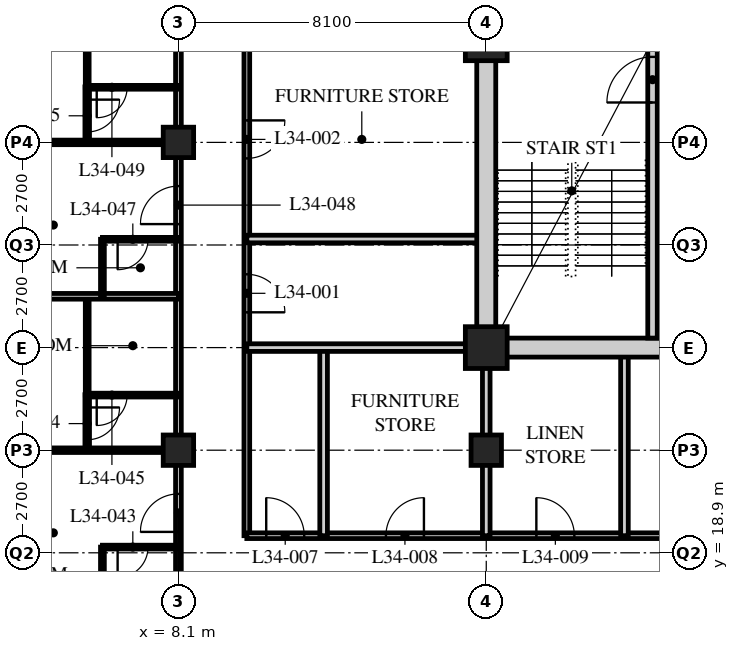
"""IFC4 building model, lengths in metres.
Left out: names, types, materials, properties, quantities, classifications, styles, units other than length and angle.
Written with IfcOpenShell. Run it as: python <this file> out.ifc"""

import sys

from ifc_helpers import new_model, si_unit, direction, frame, frame_2d, origin, origin_2d, place, context, subcontext, project, spatial, rectangle, hollow_rectangle, extrude, element, fill, save


model = new_model("IFC4")
c1 = context("Model", 3, precision=1e-05, world=origin(), true_north=direction((0.0, 1.0)))
c2 = subcontext(c1, "Body", "Model", "MODEL_VIEW")
j1 = project(units=[si_unit("LENGTHUNIT", "METRE"), si_unit("PLANEANGLEUNIT", "RADIAN")], contexts=[c1])
p1 = place(None, origin())
s1 = spatial("IfcSite", under=j1, at=p1, CompositionType="ELEMENT")
p2 = place(p1, origin())
s2 = spatial("IfcBuilding", under=s1, at=p2, CompositionType="ELEMENT")
p3 = place(p2, frame((0.0, 0.0, 134.0)))
s3 = spatial("IfcBuildingStorey", under=s2, at=p3, CompositionType="ELEMENT", Elevation=134.0)
for number, where, z_axis, x_axis in (
    (1, (8.1, 21.6, 0.0), (0.0, 0.0, 1.0), (1.0, 0.0, 0.0)),
    (2, (8.1, 29.7, 0.0), (0.0, 0.0, 1.0), (1.0, 0.0, 0.0)),
    (3, (16.2, 21.6, 0.0), (0.0, 0.0, 1.0), (1.0, 0.0, 0.0)),
):
    element("IfcColumn", number, at=place(p3, frame(where, z_axis=z_axis, x_axis=x_axis)), inside=s3, PredefinedType="COLUMN", context=c2, shape_type="SweptSolid", body=[
        extrude(hollow_rectangle(XDim=0.8, YDim=0.8, WallThickness=0.08, at=origin_2d()), origin(), (0.0, 0.0, 1.0), 3.4),
    ])
for number, where, z_axis, x_axis in (
    (4, (16.2, 24.3, 0.0), (0.0, 0.0, 1.0), (1.0, 0.0, 0.0)),
    (5, (16.2, 32.4, 0.0), (0.0, 0.0, 1.0), (1.0, 0.0, 0.0)),
):
    element("IfcColumn", number, at=place(p3, frame(where, z_axis=z_axis, x_axis=x_axis)), inside=s3, PredefinedType="COLUMN", context=c2, shape_type="SweptSolid", body=[
        extrude(hollow_rectangle(XDim=1.1, YDim=1.1, WallThickness=0.1, at=origin_2d()), origin(), (0.0, 0.0, 1.0), 3.4),
    ])
p4 = place(p3, frame((8.1, 17.55, 0.0), z_axis=(0.0, 0.0, 1.0), x_axis=(0.0, 1.0, 0.0)))
e6 = element("IfcWall", 6, at=p4, inside=s3, PredefinedType="PARTITIONING", context=c2, shape_type="SweptSolid", body=[
    extrude(rectangle(XDim=28.35, YDim=0.15, at=frame_2d((14.175, 0.0))), origin(), (0.0, 0.0, 1.0), 2.578),
])
p5 = place(p4, frame((1.9, 0.0, 0.0)))
e7 = element("IfcOpeningElement", 7, at=p5, cuts=e6, PredefinedType="OPENING", context=c2, shape_type="SweptSolid", body=[
    extrude(rectangle(XDim=1.0, YDim=2.1, at=frame_2d((0.5, 1.05))), frame((0.0, 0.085, 0.0), z_axis=(0.0, -1.0, 0.0), x_axis=(1.0, 0.0, 0.0)), (0.0, 0.0, 1.0), 0.17),
])
p6 = place(p4, frame((10.0, 0.0, 0.0)))
e8 = element("IfcOpeningElement", 8, at=p6, cuts=e6, PredefinedType="OPENING", context=c2, shape_type="SweptSolid", body=[
    extrude(rectangle(XDim=1.0, YDim=2.1, at=frame_2d((0.5, 1.05))), frame((0.0, 0.085, 0.0), z_axis=(0.0, -1.0, 0.0), x_axis=(1.0, 0.0, 0.0)), (0.0, 0.0, 1.0), 0.17),
])
p7 = place(p4, frame((18.1, 0.0, 0.0)))
e9 = element("IfcOpeningElement", 9, at=p7, cuts=e6, PredefinedType="OPENING", context=c2, shape_type="SweptSolid", body=[
    extrude(rectangle(XDim=1.0, YDim=2.1, at=frame_2d((0.5, 1.05))), frame((0.0, 0.085, 0.0), z_axis=(0.0, -1.0, 0.0), x_axis=(1.0, 0.0, 0.0)), (0.0, 0.0, 1.0), 0.17),
])
p8 = place(p4, frame((24.9, 0.0, 0.0)))
e10 = element("IfcOpeningElement", 10, at=p8, cuts=e6, PredefinedType="OPENING", context=c2, shape_type="SweptSolid", body=[
    extrude(rectangle(XDim=1.0, YDim=2.1, at=frame_2d((0.5, 1.05))), frame((0.0, 0.085, 0.0), z_axis=(0.0, -1.0, 0.0), x_axis=(1.0, 0.0, 0.0)), (0.0, 0.0, 1.0), 0.17),
])
p9 = place(p3, frame((9.9, 44.1, 0.0), z_axis=(0.0, 0.0, 1.0), x_axis=(0.0, -1.0, 0.0)))
e11 = element("IfcWall", 11, at=p9, inside=s3, PredefinedType="PARTITIONING", context=c2, shape_type="SweptSolid", body=[
    extrude(rectangle(XDim=24.75, YDim=0.15, at=frame_2d((12.375, 0.0))), origin(), (0.0, 0.0, 1.0), 3.19),
])
p10 = place(p9, frame((17.871, 0.0, 0.0)))
e12 = element("IfcOpeningElement", 12, at=p10, cuts=e11, PredefinedType="OPENING", context=c2, shape_type="SweptSolid", body=[
    extrude(rectangle(XDim=1.0, YDim=2.1, at=frame_2d((0.5, 1.05))), frame((0.0, 0.085, 0.0), z_axis=(0.0, -1.0, 0.0), x_axis=(1.0, 0.0, 0.0)), (0.0, 0.0, 1.0), 0.17),
])
p11 = place(p9, frame((13.821, 0.0, 0.0)))
e13 = element("IfcOpeningElement", 13, at=p11, cuts=e11, PredefinedType="OPENING", context=c2, shape_type="SweptSolid", body=[
    extrude(rectangle(XDim=1.0, YDim=2.1, at=frame_2d((0.5, 1.05))), frame((0.0, 0.085, 0.0), z_axis=(0.0, -1.0, 0.0), x_axis=(1.0, 0.0, 0.0)), (0.0, 0.0, 1.0), 0.17),
])
p12 = place(p9, frame((10.4, 0.0, 0.0)))
e14 = element("IfcOpeningElement", 14, at=p12, cuts=e11, PredefinedType="OPENING", context=c2, shape_type="SweptSolid", body=[
    extrude(rectangle(XDim=1.0, YDim=2.1, at=frame_2d((0.5, 1.05))), frame((0.0, 0.085, 0.0), z_axis=(0.0, -1.0, 0.0), x_axis=(1.0, 0.0, 0.0)), (0.0, 0.0, 1.0), 0.17),
])
p13 = place(p9, frame((6.35, 0.0, 0.0)))
e15 = element("IfcOpeningElement", 15, at=p13, cuts=e11, PredefinedType="OPENING", context=c2, shape_type="SweptSolid", body=[
    extrude(rectangle(XDim=1.0, YDim=2.1, at=frame_2d((0.5, 1.05))), frame((0.0, 0.085, 0.0), z_axis=(0.0, -1.0, 0.0), x_axis=(1.0, 0.0, 0.0)), (0.0, 0.0, 1.0), 0.17),
])
p14 = place(p3, frame((9.9, 19.35, 0.0), z_axis=(0.0, 0.0, 1.0), x_axis=(1.0, 0.0, 0.0)))
e16 = element("IfcWall", 16, at=p14, inside=s3, PredefinedType="PARTITIONING", context=c2, shape_type="SweptSolid", body=[
    extrude(rectangle(XDim=17.24, YDim=0.15, at=frame_2d((8.62, 0.0))), origin(), (0.0, 0.0, 1.0), 3.19),
])
p15 = place(p14, frame((0.51, 0.0, 0.0)))
e17 = element("IfcOpeningElement", 17, at=p15, cuts=e16, PredefinedType="OPENING", context=c2, shape_type="SweptSolid", body=[
    extrude(rectangle(XDim=1.0, YDim=2.1, at=frame_2d((0.5, 1.05))), frame((0.0, 0.085, 0.0), z_axis=(0.0, -1.0, 0.0), x_axis=(1.0, 0.0, 0.0)), (0.0, 0.0, 1.0), 0.17),
])
p16 = place(p14, frame((3.66, 0.0, 0.0)))
e18 = element("IfcOpeningElement", 18, at=p16, cuts=e16, PredefinedType="OPENING", context=c2, shape_type="SweptSolid", body=[
    extrude(rectangle(XDim=1.0, YDim=2.1, at=frame_2d((0.5, 1.05))), frame((0.0, 0.085, 0.0), z_axis=(0.0, -1.0, 0.0), x_axis=(1.0, 0.0, 0.0)), (0.0, 0.0, 1.0), 0.17),
])
p17 = place(p14, frame((7.618, 0.0, 0.0)))
e19 = element("IfcOpeningElement", 19, at=p17, cuts=e16, PredefinedType="OPENING", context=c2, shape_type="SweptSolid", body=[
    extrude(rectangle(XDim=1.0, YDim=2.1, at=frame_2d((0.5, 1.05))), frame((0.0, 0.085, 0.0), z_axis=(0.0, -1.0, 0.0), x_axis=(1.0, 0.0, 0.0)), (0.0, 0.0, 1.0), 0.17),
])
p18 = place(p14, frame((13.093, 0.0, 0.0)))
e20 = element("IfcOpeningElement", 20, at=p18, cuts=e16, PredefinedType="OPENING", context=c2, shape_type="SweptSolid", body=[
    extrude(rectangle(XDim=1.0, YDim=2.1, at=frame_2d((0.5, 1.05))), frame((0.0, 0.085, 0.0), z_axis=(0.0, -1.0, 0.0), x_axis=(1.0, 0.0, 0.0)), (0.0, 0.0, 1.0), 0.17),
])
p19 = place(p3, frame((9.9, 27.157, 0.0), z_axis=(0.0, 0.0, 1.0), x_axis=(1.0, 0.0, 0.0)))
e21 = element("IfcWall", 21, at=p19, inside=s3, PredefinedType="SOLIDWALL", context=c2, shape_type="SweptSolid", body=[
    extrude(rectangle(XDim=6.3, YDim=0.2, at=frame_2d((3.15, 0.0))), origin(), (0.0, 0.0, 1.0), 3.19),
])
p20 = place(p3, frame((16.2, 19.35, 0.0), z_axis=(0.0, 0.0, 1.0), x_axis=(0.0, 1.0, 0.0)))
e22 = element("IfcWall", 22, at=p20, inside=s3, PredefinedType="SOLIDWALL", context=c2, shape_type="SweptSolid", body=[
    extrude(rectangle(XDim=4.95, YDim=0.2, at=frame_2d((2.475, 0.0))), origin(), (0.0, 0.0, 1.0), 2.49),
])
for number, where, z_axis, x_axis in (
    (23, (11.92, 19.35, 0.0), (0.0, 0.0, 1.0), (0.0, 1.0, 0.0)),
    (24, (19.836, 19.35, 0.0), (0.0, 0.0, 1.0), (0.0, 1.0, 0.0)),
):
    element("IfcWall", number, at=place(p3, frame(where, z_axis=z_axis, x_axis=x_axis)), inside=s3, PredefinedType="SOLIDWALL", context=c2, shape_type="SweptSolid", body=[
        extrude(rectangle(XDim=4.95, YDim=0.2, at=frame_2d((2.475, 0.0))), origin(), (0.0, 0.0, 1.0), 3.19),
    ])
p21 = place(p3, frame((9.9, 24.3, 0.0), z_axis=(0.0, 0.0, 1.0), x_axis=(1.0, 0.0, 0.0)))
e25 = element("IfcWall", 25, at=p21, inside=s3, PredefinedType="SOLIDWALL", context=c2, shape_type="SweptSolid", body=[
    extrude(rectangle(XDim=6.3, YDim=0.2, at=frame_2d((3.15, 0.0))), origin(), (0.0, 0.0, 1.0), 3.19),
])
p22 = place(p3, frame((6.1, 17.55, 0.0), z_axis=(0.0, 0.0, 1.0), x_axis=(0.0, 1.0, 0.0)))
e26 = element("IfcWall", 26, at=p22, inside=s3, PredefinedType="PARTITIONING", context=c2, shape_type="SweptSolid", body=[
    extrude(rectangle(XDim=1.5, YDim=0.1, at=frame_2d((0.75, 0.0))), origin(), (0.0, 0.0, 1.0), 3.19),
])
p23 = place(p3, frame((8.1, 19.05, 0.0), z_axis=(0.0, 0.0, 1.0), x_axis=(-1.0, 0.0, 0.0)))
e27 = element("IfcWall", 27, at=p23, inside=s3, PredefinedType="PARTITIONING", context=c2, shape_type="SweptSolid", body=[
    extrude(rectangle(XDim=2.0, YDim=0.1, at=frame_2d((1.0, 0.0))), origin(), (0.0, 0.0, 1.0), 3.19),
])
p24 = place(p23, frame((0.8, 0.0, 0.0)))
e28 = element("IfcOpeningElement", 28, at=p24, cuts=e27, PredefinedType="OPENING", context=c2, shape_type="SweptSolid", body=[
    extrude(rectangle(XDim=0.8, YDim=2.1, at=frame_2d((0.4, 1.05))), frame((0.0, 0.06, 0.0), z_axis=(0.0, -1.0, 0.0), x_axis=(1.0, 0.0, 0.0)), (0.0, 0.0, 1.0), 0.12),
])
p25 = place(p3, frame((5.7, 23.05, 0.0), z_axis=(0.0, 0.0, 1.0), x_axis=(0.0, 1.0, 0.0)))
e29 = element("IfcWall", 29, at=p25, inside=s3, PredefinedType="PARTITIONING", context=c2, shape_type="SweptSolid", body=[
    extrude(rectangle(XDim=2.6, YDim=0.1, at=frame_2d((1.3, 0.0))), origin(), (0.0, 0.0, 1.0), 3.19),
])
p26 = place(p3, frame((8.1, 23.05, 0.0), z_axis=(0.0, 0.0, 1.0), x_axis=(-1.0, 0.0, 0.0)))
e30 = element("IfcWall", 30, at=p26, inside=s3, PredefinedType="PARTITIONING", context=c2, shape_type="SweptSolid", body=[
    extrude(rectangle(XDim=2.4, YDim=0.1, at=frame_2d((1.2, 0.0))), origin(), (0.0, 0.0, 1.0), 3.19),
])
p27 = place(p26, frame((1.35, 0.0, 0.0)))
e31 = element("IfcOpeningElement", 31, at=p27, cuts=e30, PredefinedType="OPENING", context=c2, shape_type="SweptSolid", body=[
    extrude(rectangle(XDim=0.8, YDim=2.1, at=frame_2d((0.4, 1.05))), frame((0.0, 0.06, 0.0), z_axis=(0.0, -1.0, 0.0), x_axis=(1.0, 0.0, 0.0)), (0.0, 0.0, 1.0), 0.12),
])
p28 = place(p3, frame((8.1, 21.6, 0.0), z_axis=(0.0, 0.0, 1.0), x_axis=(-1.0, 0.0, 0.0)))
e32 = element("IfcWall", 32, at=p28, inside=s3, PredefinedType="PARTITIONING", context=c2, shape_type="SweptSolid", body=[
    extrude(rectangle(XDim=7.8, YDim=0.12, at=frame_2d((3.9, 0.0))), origin(), (0.0, 0.0, 1.0), 2.578),
])
p29 = place(p28, frame((4.825, 0.0, 0.0)))
e33 = element("IfcOpeningElement", 33, at=p29, cuts=e32, PredefinedType="OPENING", context=c2, shape_type="SweptSolid", body=[
    extrude(rectangle(XDim=0.85, YDim=2.1, at=frame_2d((0.425, 1.05))), frame((0.0, 0.07, 0.0), z_axis=(0.0, -1.0, 0.0), x_axis=(1.0, 0.0, 0.0)), (0.0, 0.0, 1.0), 0.14),
])
p30 = place(p3, frame((8.1, 25.65, 0.0), z_axis=(0.0, 0.0, 1.0), x_axis=(-1.0, 0.0, 0.0)))
e34 = element("IfcWall", 34, at=p30, inside=s3, PredefinedType="PARTITIONING", context=c2, shape_type="SweptSolid", body=[
    extrude(rectangle(XDim=7.8, YDim=0.15, at=frame_2d((3.9, 0.0))), origin(), (0.0, 0.0, 1.0), 3.19),
])
p31 = place(p3, frame((6.1, 25.65, 0.0), z_axis=(0.0, 0.0, 1.0), x_axis=(0.0, 1.0, 0.0)))
e35 = element("IfcWall", 35, at=p31, inside=s3, PredefinedType="PARTITIONING", context=c2, shape_type="SweptSolid", body=[
    extrude(rectangle(XDim=1.5, YDim=0.1, at=frame_2d((0.75, 0.0))), origin(), (0.0, 0.0, 1.0), 3.19),
])
p32 = place(p3, frame((8.1, 27.15, 0.0), z_axis=(0.0, 0.0, 1.0), x_axis=(-1.0, 0.0, 0.0)))
e36 = element("IfcWall", 36, at=p32, inside=s3, PredefinedType="PARTITIONING", context=c2, shape_type="SweptSolid", body=[
    extrude(rectangle(XDim=2.0, YDim=0.1, at=frame_2d((1.0, 0.0))), origin(), (0.0, 0.0, 1.0), 3.19),
])
p33 = place(p32, frame((0.8, 0.0, 0.0)))
e37 = element("IfcOpeningElement", 37, at=p33, cuts=e36, PredefinedType="OPENING", context=c2, shape_type="SweptSolid", body=[
    extrude(rectangle(XDim=0.8, YDim=2.1, at=frame_2d((0.4, 1.05))), frame((0.0, 0.06, 0.0), z_axis=(0.0, -1.0, 0.0), x_axis=(1.0, 0.0, 0.0)), (0.0, 0.0, 1.0), 0.12),
])
p34 = place(p3, frame((5.7, 31.15, 0.0), z_axis=(0.0, 0.0, 1.0), x_axis=(0.0, 1.0, 0.0)))
e38 = element("IfcWall", 38, at=p34, inside=s3, PredefinedType="PARTITIONING", context=c2, shape_type="SweptSolid", body=[
    extrude(rectangle(XDim=2.6, YDim=0.1, at=frame_2d((1.3, 0.0))), origin(), (0.0, 0.0, 1.0), 3.19),
])
p35 = place(p3, frame((8.1, 31.15, 0.0), z_axis=(0.0, 0.0, 1.0), x_axis=(-1.0, 0.0, 0.0)))
e39 = element("IfcWall", 39, at=p35, inside=s3, PredefinedType="PARTITIONING", context=c2, shape_type="SweptSolid", body=[
    extrude(rectangle(XDim=2.4, YDim=0.1, at=frame_2d((1.2, 0.0))), origin(), (0.0, 0.0, 1.0), 3.19),
])
p36 = place(p35, frame((1.35, 0.0, 0.0)))
e40 = element("IfcOpeningElement", 40, at=p36, cuts=e39, PredefinedType="OPENING", context=c2, shape_type="SweptSolid", body=[
    extrude(rectangle(XDim=0.8, YDim=2.1, at=frame_2d((0.4, 1.05))), frame((0.0, 0.06, 0.0), z_axis=(0.0, -1.0, 0.0), x_axis=(1.0, 0.0, 0.0)), (0.0, 0.0, 1.0), 0.12),
])
p37 = place(p3, frame((8.1, 29.7, 0.0), z_axis=(0.0, 0.0, 1.0), x_axis=(-1.0, 0.0, 0.0)))
e41 = element("IfcWall", 41, at=p37, inside=s3, PredefinedType="PARTITIONING", context=c2, shape_type="SweptSolid", body=[
    extrude(rectangle(XDim=7.8, YDim=0.12, at=frame_2d((3.9, 0.0))), origin(), (0.0, 0.0, 1.0), 2.578),
])
p38 = place(p37, frame((4.825, 0.0, 0.0)))
e42 = element("IfcOpeningElement", 42, at=p38, cuts=e41, PredefinedType="OPENING", context=c2, shape_type="SweptSolid", body=[
    extrude(rectangle(XDim=0.85, YDim=2.1, at=frame_2d((0.425, 1.05))), frame((0.0, 0.07, 0.0), z_axis=(0.0, -1.0, 0.0), x_axis=(1.0, 0.0, 0.0)), (0.0, 0.0, 1.0), 0.14),
])
p39 = place(p3, frame((5.7, 21.6, 0.0), z_axis=(0.0, 0.0, 1.0), x_axis=(0.0, 1.0, 0.0)))
e43 = element("IfcWall", 43, at=p39, inside=s3, PredefinedType="PARTITIONING", context=c2, shape_type="SweptSolid", body=[
    extrude(rectangle(XDim=1.46, YDim=0.12, at=frame_2d((0.73, 0.0))), origin(), (0.0, 0.0, 1.0), 3.19),
])
p40 = place(p39, frame((0.275, 0.0, 0.0)))
e44 = element("IfcOpeningElement", 44, at=p40, cuts=e43, PredefinedType="OPENING", context=c2, shape_type="SweptSolid", body=[
    extrude(rectangle(XDim=0.85, YDim=2.1, at=frame_2d((0.425, 1.05))), frame((0.0, 0.07, 0.0), z_axis=(0.0, -1.0, 0.0), x_axis=(1.0, 0.0, 0.0)), (0.0, 0.0, 1.0), 0.14),
])
p41 = place(p3, frame((5.7, 29.7, 0.0), z_axis=(0.0, 0.0, 1.0), x_axis=(0.0, 1.0, 0.0)))
e45 = element("IfcWall", 45, at=p41, inside=s3, PredefinedType="PARTITIONING", context=c2, shape_type="SweptSolid", body=[
    extrude(rectangle(XDim=1.46, YDim=0.12, at=frame_2d((0.73, 0.0))), origin(), (0.0, 0.0, 1.0), 3.19),
])
p42 = place(p41, frame((0.275, 0.0, 0.0)))
e46 = element("IfcOpeningElement", 46, at=p42, cuts=e45, PredefinedType="OPENING", context=c2, shape_type="SweptSolid", body=[
    extrude(rectangle(XDim=0.85, YDim=2.1, at=frame_2d((0.425, 1.05))), frame((0.0, 0.07, 0.0), z_axis=(0.0, -1.0, 0.0), x_axis=(1.0, 0.0, 0.0)), (0.0, 0.0, 1.0), 0.14),
])
p43 = place(p3, frame((15.95, 24.3, 0.0), z_axis=(0.0, 0.0, 1.0), x_axis=(1.0, 0.0, 0.0)))
e47 = element("IfcWall", 47, at=p43, inside=s3, PredefinedType="SOLIDWALL", context=c2, shape_type="SweptSolid", body=[
    extrude(rectangle(XDim=24.8, YDim=0.5, at=frame_2d((12.4, 0.0))), origin(), (0.0, 0.0, 1.0), 2.54),
])
p44 = place(p43, frame((11.5, 0.0, 0.0)))
e48 = element("IfcOpeningElement", 48, at=p44, cuts=e47, PredefinedType="OPENING", context=c2, shape_type="SweptSolid", body=[
    extrude(rectangle(XDim=1.8, YDim=2.4, at=frame_2d((0.9, 1.2))), frame((0.0, 0.26, 0.0), z_axis=(0.0, -1.0, 0.0), x_axis=(1.0, 0.0, 0.0)), (0.0, 0.0, 1.0), 0.52),
])
p45 = place(p3, frame((16.2, 24.55, 0.0), z_axis=(0.0, 0.0, 1.0), x_axis=(0.0, 1.0, 0.0)))
e49 = element("IfcWall", 49, at=p45, inside=s3, PredefinedType="SOLIDWALL", context=c2, shape_type="SweptSolid", body=[
    extrude(rectangle(XDim=15.7, YDim=0.5, at=frame_2d((7.85, 0.0))), origin(), (0.0, 0.0, 1.0), 2.578),
])
p46 = place(p3, frame((20.575, 24.55, 0.0), z_axis=(0.0, 0.0, 1.0), x_axis=(0.0, 1.0, 0.0)))
e50 = element("IfcWall", 50, at=p46, inside=s3, PredefinedType="SOLIDWALL", context=c2, shape_type="SweptSolid", body=[
    extrude(rectangle(XDim=7.75, YDim=0.25, at=frame_2d((3.875, 0.0))), origin(), (0.0, 0.0, 1.0), 3.19),
])
p47 = place(p46, frame((6.2, 0.0, 0.0)))
e51 = element("IfcOpeningElement", 51, at=p47, cuts=e50, PredefinedType="OPENING", context=c2, shape_type="SweptSolid", body=[
    extrude(rectangle(XDim=1.2, YDim=2.1, at=frame_2d((0.6, 1.05))), frame((0.0, 0.135, 0.0), z_axis=(0.0, -1.0, 0.0), x_axis=(1.0, 0.0, 0.0)), (0.0, 0.0, 1.0), 0.27),
])
p48 = place(p10, origin())
e52 = element("IfcDoor", 52, at=p48, inside=s3, OperationType="SINGLE_SWING_RIGHT", PredefinedType="DOOR", context=c2, shape_type="SweptSolid", body=[
    extrude(rectangle(XDim=1.0, YDim=2.1, at=frame_2d((0.5, 1.05))), frame((0.0, 0.025, 0.0), z_axis=(0.0, -1.0, 0.0), x_axis=(1.0, 0.0, 0.0)), (0.0, 0.0, 1.0), 0.05),
])
fill(e12, e52)
p49 = place(p11, origin())
e53 = element("IfcDoor", 53, at=p49, inside=s3, OperationType="SINGLE_SWING_LEFT", PredefinedType="DOOR", context=c2, shape_type="SweptSolid", body=[
    extrude(rectangle(XDim=1.0, YDim=2.1, at=frame_2d((0.5, 1.05))), frame((0.0, 0.025, 0.0), z_axis=(0.0, -1.0, 0.0), x_axis=(1.0, 0.0, 0.0)), (0.0, 0.0, 1.0), 0.05),
])
fill(e13, e53)
p50 = place(p15, origin())
e54 = element("IfcDoor", 54, at=p50, inside=s3, OperationType="SINGLE_SWING_LEFT", PredefinedType="DOOR", context=c2, shape_type="SweptSolid", body=[
    extrude(rectangle(XDim=1.0, YDim=2.1, at=frame_2d((0.5, 1.05))), frame((0.0, 0.025, 0.0), z_axis=(0.0, -1.0, 0.0), x_axis=(1.0, 0.0, 0.0)), (0.0, 0.0, 1.0), 0.05),
])
fill(e17, e54)
p51 = place(p16, origin())
e55 = element("IfcDoor", 55, at=p51, inside=s3, OperationType="SINGLE_SWING_RIGHT", PredefinedType="DOOR", context=c2, shape_type="SweptSolid", body=[
    extrude(rectangle(XDim=1.0, YDim=2.1, at=frame_2d((0.5, 1.05))), frame((0.0, 0.025, 0.0), z_axis=(0.0, -1.0, 0.0), x_axis=(1.0, 0.0, 0.0)), (0.0, 0.0, 1.0), 0.05),
])
fill(e18, e55)
p52 = place(p17, origin())
e56 = element("IfcDoor", 56, at=p52, inside=s3, OperationType="SINGLE_SWING_LEFT", PredefinedType="DOOR", context=c2, shape_type="SweptSolid", body=[
    extrude(rectangle(XDim=1.0, YDim=2.1, at=frame_2d((0.5, 1.05))), frame((0.0, 0.025, 0.0), z_axis=(0.0, -1.0, 0.0), x_axis=(1.0, 0.0, 0.0)), (0.0, 0.0, 1.0), 0.05),
])
fill(e19, e56)
p53 = place(p24, origin())
e57 = element("IfcDoor", 57, at=p53, inside=s3, OperationType="SINGLE_SWING_RIGHT", PredefinedType="DOOR", context=c2, shape_type="SweptSolid", body=[
    extrude(rectangle(XDim=0.8, YDim=2.1, at=frame_2d((0.4, 1.05))), frame((0.0, 0.025, 0.0), z_axis=(0.0, -1.0, 0.0), x_axis=(1.0, 0.0, 0.0)), (0.0, 0.0, 1.0), 0.05),
])
fill(e28, e57)
p54 = place(p5, origin())
e58 = element("IfcDoor", 58, at=p54, inside=s3, OperationType="SINGLE_SWING_LEFT", PredefinedType="DOOR", context=c2, shape_type="SweptSolid", body=[
    extrude(rectangle(XDim=1.0, YDim=2.1, at=frame_2d((0.5, 1.05))), frame((0.0, 0.025, 0.0), z_axis=(0.0, -1.0, 0.0), x_axis=(1.0, 0.0, 0.0)), (0.0, 0.0, 1.0), 0.05),
])
fill(e7, e58)
p55 = place(p27, origin())
e59 = element("IfcDoor", 59, at=p55, inside=s3, OperationType="SINGLE_SWING_RIGHT", PredefinedType="DOOR", context=c2, shape_type="SweptSolid", body=[
    extrude(rectangle(XDim=0.8, YDim=2.1, at=frame_2d((0.4, 1.05))), frame((0.0, 0.025, 0.0), z_axis=(0.0, -1.0, 0.0), x_axis=(1.0, 0.0, 0.0)), (0.0, 0.0, 1.0), 0.05),
])
fill(e31, e59)
p56 = place(p33, origin())
e60 = element("IfcDoor", 60, at=p56, inside=s3, OperationType="SINGLE_SWING_RIGHT", PredefinedType="DOOR", context=c2, shape_type="SweptSolid", body=[
    extrude(rectangle(XDim=0.8, YDim=2.1, at=frame_2d((0.4, 1.05))), frame((0.0, 0.025, 0.0), z_axis=(0.0, -1.0, 0.0), x_axis=(1.0, 0.0, 0.0)), (0.0, 0.0, 1.0), 0.05),
])
fill(e37, e60)
p57 = place(p6, origin())
e61 = element("IfcDoor", 61, at=p57, inside=s3, OperationType="SINGLE_SWING_LEFT", PredefinedType="DOOR", context=c2, shape_type="SweptSolid", body=[
    extrude(rectangle(XDim=1.0, YDim=2.1, at=frame_2d((0.5, 1.05))), frame((0.0, 0.025, 0.0), z_axis=(0.0, -1.0, 0.0), x_axis=(1.0, 0.0, 0.0)), (0.0, 0.0, 1.0), 0.05),
])
fill(e8, e61)
p58 = place(p36, origin())
e62 = element("IfcDoor", 62, at=p58, inside=s3, OperationType="SINGLE_SWING_RIGHT", PredefinedType="DOOR", context=c2, shape_type="SweptSolid", body=[
    extrude(rectangle(XDim=0.8, YDim=2.1, at=frame_2d((0.4, 1.05))), frame((0.0, 0.025, 0.0), z_axis=(0.0, -1.0, 0.0), x_axis=(1.0, 0.0, 0.0)), (0.0, 0.0, 1.0), 0.05),
])
fill(e40, e62)
p59 = place(p40, origin())
e63 = element("IfcDoor", 63, at=p59, inside=s3, OperationType="SINGLE_SWING_LEFT", PredefinedType="DOOR", context=c2, shape_type="SweptSolid", body=[
    extrude(rectangle(XDim=0.85, YDim=2.1, at=frame_2d((0.425, 1.05))), frame((0.0, 0.025, 0.0), z_axis=(0.0, -1.0, 0.0), x_axis=(1.0, 0.0, 0.0)), (0.0, 0.0, 1.0), 0.05),
])
fill(e44, e63)
p60 = place(p42, origin())
e64 = element("IfcDoor", 64, at=p60, inside=s3, OperationType="SINGLE_SWING_LEFT", PredefinedType="DOOR", context=c2, shape_type="SweptSolid", body=[
    extrude(rectangle(XDim=0.85, YDim=2.1, at=frame_2d((0.425, 1.05))), frame((0.0, 0.025, 0.0), z_axis=(0.0, -1.0, 0.0), x_axis=(1.0, 0.0, 0.0)), (0.0, 0.0, 1.0), 0.05),
])
fill(e46, e64)
p61 = place(p47, origin())
e65 = element("IfcDoor", 65, at=p61, inside=s3, OperationType="SINGLE_SWING_LEFT", PredefinedType="DOOR", context=c2, shape_type="SweptSolid", body=[
    extrude(rectangle(XDim=1.2, YDim=2.1, at=frame_2d((0.6, 1.05))), frame((0.0, 0.025, 0.0), z_axis=(0.0, -1.0, 0.0), x_axis=(1.0, 0.0, 0.0)), (0.0, 0.0, 1.0), 0.05),
])
fill(e51, e65)
save(model, sys.argv[1])
